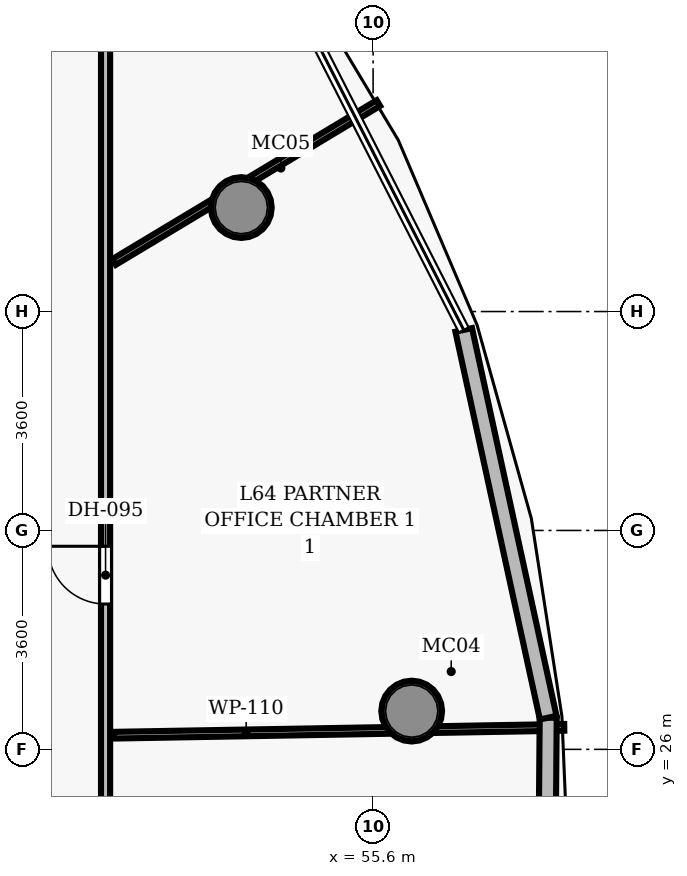
"""IFC4 building model, lengths in metres.
Left out: names, types, materials, properties, quantities, classifications, styles, units other than length and angle.
Written with IfcOpenShell. Run it as: python <this file> out.ifc"""

import sys

from ifc_helpers import new_model, si_unit, direction, frame, frame_2d, origin, origin_2d, place, context, subcontext, project, spatial, rectangle, hollow_circle, extrude, element, fill, save


model = new_model("IFC4")
c1 = context("Model", 3, precision=1e-05, world=origin(), true_north=direction((0.0, 1.0)))
c2 = subcontext(c1, "Body", "Model", "MODEL_VIEW")
j1 = project(units=[si_unit("LENGTHUNIT", "METRE"), si_unit("PLANEANGLEUNIT", "RADIAN")], contexts=[c1])
p1 = place(None, origin())
s1 = spatial("IfcSite", under=j1, at=p1, CompositionType="ELEMENT")
p2 = place(p1, origin())
s2 = spatial("IfcBuilding", under=s1, at=p2, CompositionType="ELEMENT")
p3 = place(p2, frame((0.0, 0.0, 253.6)))
s3 = spatial("IfcBuildingStorey", under=s2, at=p3, CompositionType="ELEMENT", Elevation=253.6)
for number, where, z_axis, x_axis in (
    (1, (56.235, 26.629, 0.0), (0.0, 0.0, 1.0), (1.0, 0.0, 0.0)),
    (2, (53.433, 34.91, 0.0), (0.0, 0.0, 1.0), (1.0, 0.0, 0.0)),
):
    element("IfcColumn", number, at=place(p3, frame(where, z_axis=z_axis, x_axis=x_axis)), inside=s3, PredefinedType="COLUMN", context=c2, shape_type="SweptSolid", body=[
        extrude(hollow_circle(Radius=0.5, WallThickness=0.045, at=origin_2d()), origin(), (0.0, 0.0, 1.0), 3.85),
    ])
p4 = place(p3, frame((51.2, 10.6, 0.0), z_axis=(0.0, 0.0, 1.0), x_axis=(0.0, 1.0, 0.0)))
e3 = element("IfcWall", 3, at=p4, inside=s3, PredefinedType="PARTITIONING", context=c2, shape_type="SweptSolid", body=[
    extrude(rectangle(XDim=30.8, YDim=0.15, at=frame_2d((15.4, 0.0))), origin(), (0.0, 0.0, 1.0), 3.04),
])
p5 = place(p4, frame((17.79, 0.0, 0.0)))
e4 = element("IfcOpeningElement", 4, at=p5, cuts=e3, PredefinedType="OPENING", context=c2, shape_type="SweptSolid", body=[
    extrude(rectangle(XDim=0.95, YDim=2.15, at=frame_2d((0.475, 1.075))), frame((0.0, 0.085, 0.0), z_axis=(0.0, -1.0, 0.0), x_axis=(1.0, 0.0, 0.0)), (0.0, 0.0, 1.0), 0.17),
])
p6 = place(p4, frame((11.348, 0.0, 0.0)))
e5 = element("IfcOpeningElement", 5, at=p6, cuts=e3, PredefinedType="OPENING", context=c2, shape_type="SweptSolid", body=[
    extrude(rectangle(XDim=0.95, YDim=2.15, at=frame_2d((0.475, 1.075))), frame((0.0, 0.085, 0.0), z_axis=(0.0, -1.0, 0.0), x_axis=(1.0, 0.0, 0.0)), (0.0, 0.0, 1.0), 0.17),
])
p7 = place(p3, frame((51.34, 26.233, 0.0), z_axis=(0.0, 0.0, 1.0), x_axis=(0.999847881994, 0.017441699244, 0.0)))
e6 = element("IfcWall", 6, at=p7, inside=s3, PredefinedType="PARTITIONING", context=c2, shape_type="SweptSolid", body=[
    extrude(rectangle(XDim=7.405, YDim=0.11, at=frame_2d((3.702, 0.0))), origin(), (0.0, 0.0, 1.0), 3.04),
])
p8 = place(p3, frame((51.34, 34.015, 0.0), z_axis=(0.0, 0.0, 1.0), x_axis=(0.857144436963, 0.515076124649, 0.0)))
e7 = element("IfcWall", 7, at=p8, inside=s3, PredefinedType="PARTITIONING", context=c2, shape_type="SweptSolid", body=[
    extrude(rectangle(XDim=5.072, YDim=0.11, at=frame_2d((2.536, 0.0))), origin(), (0.0, 0.0, 1.0), 3.04),
])
p9 = place(p3, frame((58.48, 26.521, 0.0), z_axis=(0.0, 0.0, 1.0), x_axis=(-0.008349395362, -0.999965143191, 0.0)))
e8 = element("IfcWall", 8, at=p9, inside=s3, PredefinedType="SOLIDWALL", context=c2, shape_type="SweptSolid", body=[
    extrude(rectangle(XDim=6.345, YDim=0.28, at=frame_2d((3.173, 0.0))), origin(), (0.0, 0.0, 1.0), 3.625),
])
p10 = place(p3, frame((57.09, 32.898, 0.0), z_axis=(0.0, 0.0, 1.0), x_axis=(0.212892433961, -0.977075642702, 0.0)))
e9 = element("IfcWall", 9, at=p10, inside=s3, PredefinedType="SOLIDWALL", context=c2, shape_type="SweptSolid", body=[
    extrude(rectangle(XDim=6.526, YDim=0.28, at=frame_2d((3.263, 0.0))), origin(), (0.0, 0.0, 1.0), 3.625),
])
p11 = place(p5, origin())
e10 = element("IfcDoor", 10, at=p11, inside=s3, OperationType="SINGLE_SWING_RIGHT", PredefinedType="DOOR", context=c2, shape_type="SweptSolid", body=[
    extrude(rectangle(XDim=0.95, YDim=2.15, at=frame_2d((0.475, 1.075))), frame((0.0, 0.025, 0.0), z_axis=(0.0, -1.0, 0.0), x_axis=(1.0, 0.0, 0.0)), (0.0, 0.0, 1.0), 0.05),
])
fill(e4, e10)
save(model, sys.argv[1])
